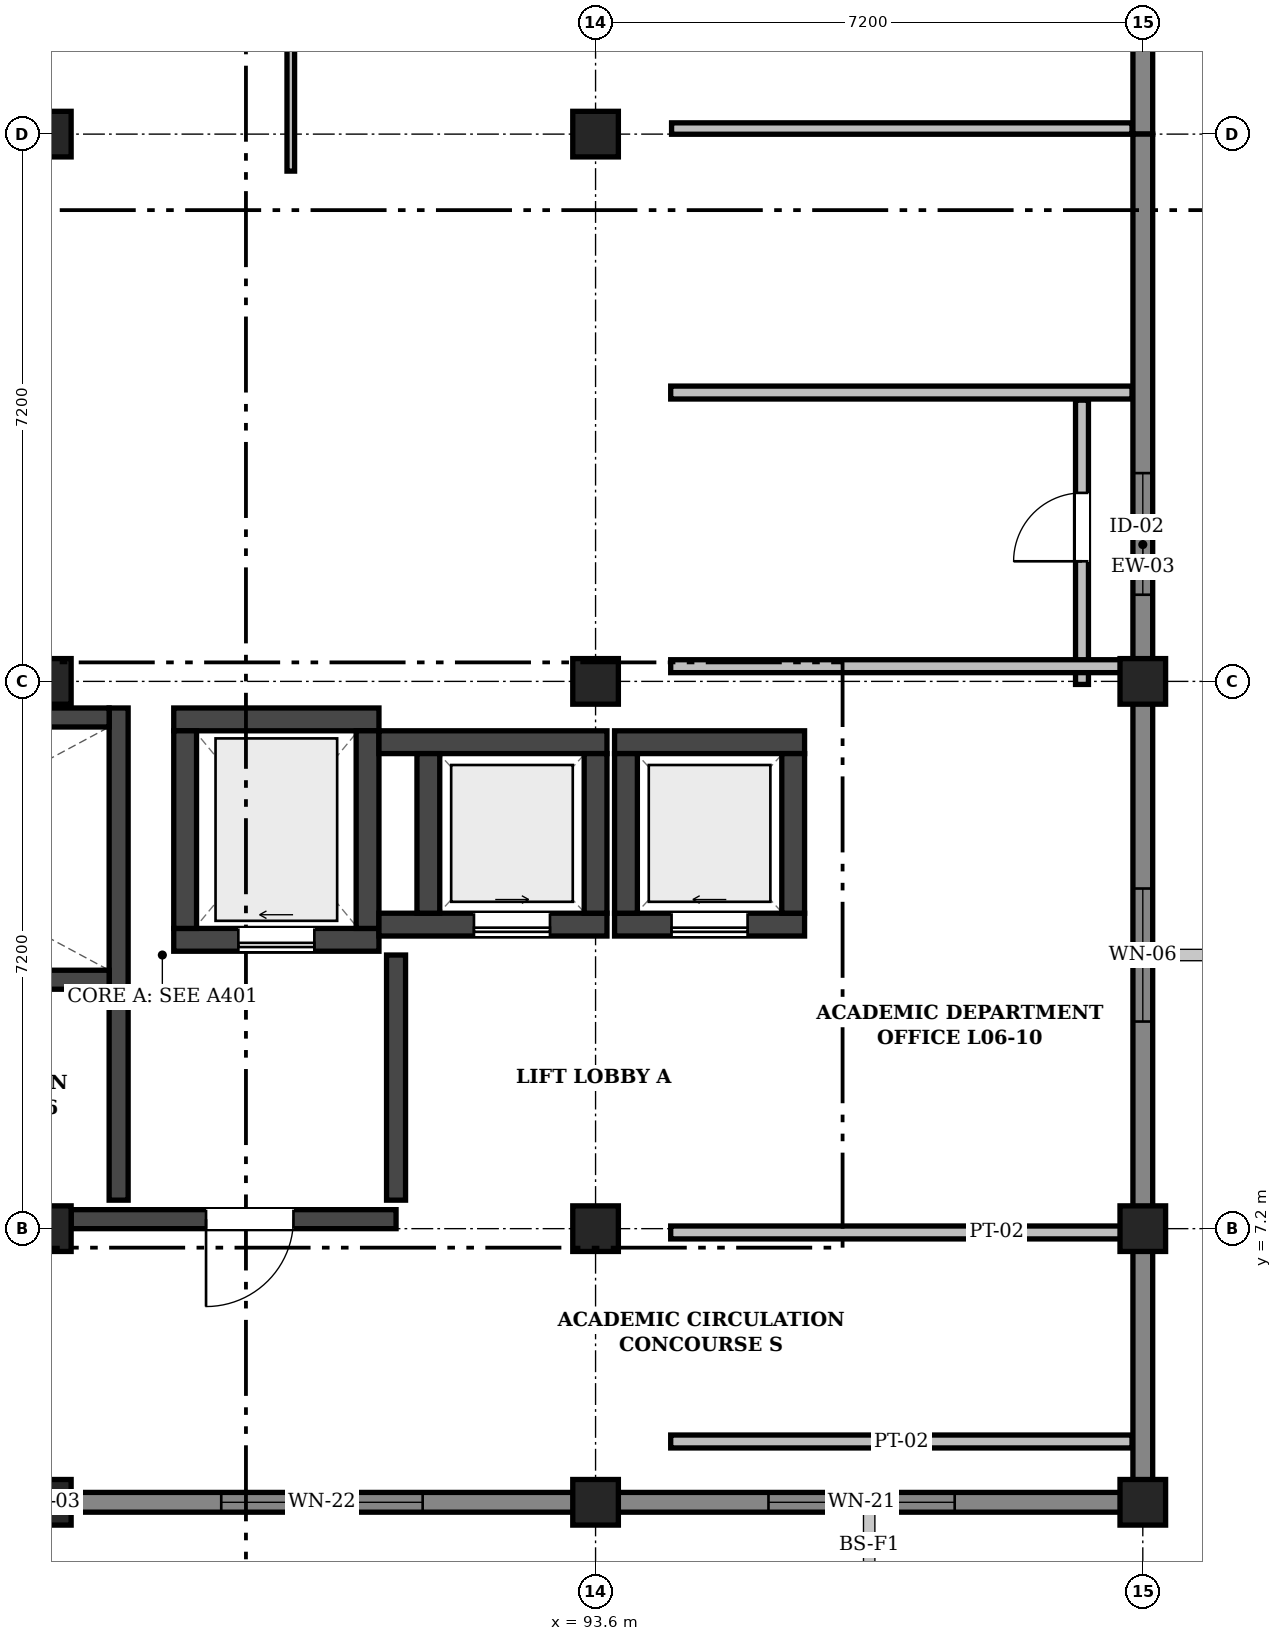
"""IFC4 building model, lengths in metres.
Left out: names, types, materials, properties, quantities, classifications, styles, units other than length and angle.
Written with IfcOpenShell. Run it as: python <this file> out.ifc"""

import sys

from ifc_helpers import new_model, si_unit, direction, frame, frame_2d, origin, origin_2d, place, context, subcontext, project, spatial, rectangle, extrude, element, fill, save


model = new_model("IFC4")
c1 = context("Model", 3, precision=1e-05, world=origin(), true_north=direction((0.0, 1.0)))
c2 = subcontext(c1, "Body", "Model", "MODEL_VIEW")
j1 = project(units=[si_unit("LENGTHUNIT", "METRE"), si_unit("PLANEANGLEUNIT", "RADIAN")], contexts=[c1])
p1 = place(None, origin())
s1 = spatial("IfcSite", under=j1, at=p1, CompositionType="ELEMENT")
p2 = place(p1, origin())
s2 = spatial("IfcBuilding", under=s1, at=p2, CompositionType="ELEMENT")
p3 = place(p2, frame((0.0, 0.0, 27.9)))
s3 = spatial("IfcBuildingStorey", under=s2, at=p3, CompositionType="ELEMENT", Elevation=27.9)
for number, where, z_axis, x_axis in (
    (1, (86.4, 3.6, 0.0), (0.0, 0.0, 1.0), (1.0, 0.0, 0.0)),
    (2, (86.4, 7.2, 0.0), (0.0, 0.0, 1.0), (1.0, 0.0, 0.0)),
    (3, (86.4, 14.4, 0.0), (0.0, 0.0, 1.0), (1.0, 0.0, 0.0)),
    (4, (86.4, 21.6, 0.0), (0.0, 0.0, 1.0), (1.0, 0.0, 0.0)),
    (5, (93.6, 3.6, 0.0), (0.0, 0.0, 1.0), (1.0, 0.0, 0.0)),
    (6, (93.6, 7.2, 0.0), (0.0, 0.0, 1.0), (1.0, 0.0, 0.0)),
    (7, (93.6, 14.4, 0.0), (0.0, 0.0, 1.0), (1.0, 0.0, 0.0)),
    (8, (93.6, 21.6, 0.0), (0.0, 0.0, 1.0), (1.0, 0.0, 0.0)),
    (9, (100.8, 3.6, 0.0), (0.0, 0.0, 1.0), (1.0, 0.0, 0.0)),
    (10, (100.8, 7.2, 0.0), (0.0, 0.0, 1.0), (1.0, 0.0, 0.0)),
    (11, (100.8, 14.4, 0.0), (0.0, 0.0, 1.0), (1.0, 0.0, 0.0)),
):
    element("IfcColumn", number, at=place(p3, frame(where, z_axis=z_axis, x_axis=x_axis)), inside=s3, PredefinedType="COLUMN", context=c2, shape_type="SweptSolid", body=[
        extrude(rectangle(XDim=0.6, YDim=0.6, at=origin_2d()), origin(), (0.0, 0.0, 1.0), 4.5),
    ])
p4 = place(p3, frame((100.95, 3.6, 0.0), z_axis=(0.0, 0.0, 1.0), x_axis=(-1.0, 0.0, 0.0)))
e12 = element("IfcWall", 12, at=p4, inside=s3, PredefinedType="SOLIDWALL", context=c2, shape_type="SweptSolid", body=[
    extrude(rectangle(XDim=7.35, YDim=0.26, at=frame_2d((3.675, 0.0))), origin(), (0.0, 0.0, 1.0), 4.22),
])
p5 = place(p4, frame((2.625, 0.0, 0.95)))
e13 = element("IfcOpeningElement", 13, at=p5, cuts=e12, PredefinedType="OPENING", context=c2, shape_type="SweptSolid", body=[
    extrude(rectangle(XDim=2.45, YDim=1.55, at=frame_2d((1.225, 0.775))), frame((0.0, 0.142, 0.0), z_axis=(0.0, -1.0, 0.0), x_axis=(1.0, 0.0, 0.0)), (0.0, 0.0, 1.0), 0.284),
])
p6 = place(p3, frame((93.6, 3.6, 0.0), z_axis=(0.0, 0.0, 1.0), x_axis=(-1.0, 0.0, 0.0)))
e14 = element("IfcWall", 14, at=p6, inside=s3, PredefinedType="SOLIDWALL", context=c2, shape_type="SweptSolid", body=[
    extrude(rectangle(XDim=7.2, YDim=0.26, at=frame_2d((3.6, 0.0))), origin(), (0.0, 0.0, 1.0), 4.22),
])
p7 = place(p6, frame((2.275, 0.0, 0.95)))
e15 = element("IfcOpeningElement", 15, at=p7, cuts=e14, PredefinedType="OPENING", context=c2, shape_type="SweptSolid", body=[
    extrude(rectangle(XDim=2.65, YDim=1.55, at=frame_2d((1.325, 0.775))), frame((0.0, 0.142, 0.0), z_axis=(0.0, -1.0, 0.0), x_axis=(1.0, 0.0, 0.0)), (0.0, 0.0, 1.0), 0.284),
])
p8 = place(p3, frame((100.8, 28.648, 0.0), z_axis=(0.0, 0.0, 1.0), x_axis=(0.0, -1.0, 0.0)))
e16 = element("IfcWall", 16, at=p8, inside=s3, PredefinedType="SOLIDWALL", context=c2, shape_type="SweptSolid", body=[
    extrude(rectangle(XDim=7.048, YDim=0.26, at=frame_2d((3.524, 0.0))), origin(), (0.0, 0.0, 1.0), 4.22),
])
p9 = place(p8, frame((2.799, 0.0, 0.95)))
e17 = element("IfcOpeningElement", 17, at=p9, cuts=e16, PredefinedType="OPENING", context=c2, shape_type="SweptSolid", body=[
    extrude(rectangle(XDim=1.45, YDim=1.3, at=frame_2d((0.725, 0.65))), frame((0.0, 0.142, 0.0), z_axis=(0.0, -1.0, 0.0), x_axis=(1.0, 0.0, 0.0)), (0.0, 0.0, 1.0), 0.284),
])
p10 = place(p3, frame((100.8, 21.6, 0.0), z_axis=(0.0, 0.0, 1.0), x_axis=(0.0, -1.0, 0.0)))
e18 = element("IfcWall", 18, at=p10, inside=s3, PredefinedType="SOLIDWALL", context=c2, shape_type="SweptSolid", body=[
    extrude(rectangle(XDim=7.2, YDim=0.26, at=frame_2d((3.6, 0.0))), origin(), (0.0, 0.0, 1.0), 4.22),
])
p11 = place(p10, frame((4.46, 0.0, 0.95)))
e19 = element("IfcOpeningElement", 19, at=p11, cuts=e18, PredefinedType="OPENING", context=c2, shape_type="SweptSolid", body=[
    extrude(rectangle(XDim=1.6, YDim=1.3, at=frame_2d((0.8, 0.65))), frame((0.0, 0.142, 0.0), z_axis=(0.0, -1.0, 0.0), x_axis=(1.0, 0.0, 0.0)), (0.0, 0.0, 1.0), 0.284),
])
p12 = place(p3, frame((100.8, 14.4, 0.0), z_axis=(0.0, 0.0, 1.0), x_axis=(0.0, -1.0, 0.0)))
e20 = element("IfcWall", 20, at=p12, inside=s3, PredefinedType="SOLIDWALL", context=c2, shape_type="SweptSolid", body=[
    extrude(rectangle(XDim=7.2, YDim=0.26, at=frame_2d((3.6, 0.0))), origin(), (0.0, 0.0, 1.0), 4.22),
])
p13 = place(p12, frame((2.725, 0.0, 0.95)))
e21 = element("IfcOpeningElement", 21, at=p13, cuts=e20, PredefinedType="OPENING", context=c2, shape_type="SweptSolid", body=[
    extrude(rectangle(XDim=1.75, YDim=1.3, at=frame_2d((0.875, 0.65))), frame((0.0, 0.142, 0.0), z_axis=(0.0, -1.0, 0.0), x_axis=(1.0, 0.0, 0.0)), (0.0, 0.0, 1.0), 0.284),
])
p14 = place(p3, frame((100.8, 7.2, 0.0), z_axis=(0.0, 0.0, 1.0), x_axis=(0.0, -1.0, 0.0)))
e22 = element("IfcWall", 22, at=p14, inside=s3, PredefinedType="SOLIDWALL", context=c2, shape_type="SweptSolid", body=[
    extrude(rectangle(XDim=3.448, YDim=0.26, at=frame_2d((1.724, 0.0))), origin(), (0.0, 0.0, 1.0), 4.22),
])
p15 = place(p3, frame((88.05, 11.0, 0.0), z_axis=(0.0, 0.0, 1.0), x_axis=(1.0, 0.0, 0.0)))
e23 = element("IfcWall", 23, at=p15, inside=s3, PredefinedType="SHEAR", context=c2, shape_type="SweptSolid", body=[
    extrude(rectangle(XDim=2.7, YDim=0.3, at=frame_2d((1.35, 0.0))), origin(), (0.0, 0.0, 1.0), 4.25),
])
p16 = place(p15, frame((0.85, 0.0, 0.0)))
e24 = element("IfcOpeningElement", 24, at=p16, cuts=e23, PredefinedType="OPENING", context=c2, shape_type="SweptSolid", body=[
    extrude(rectangle(XDim=1.0, YDim=2.1, at=frame_2d((0.5, 1.05))), frame((0.0, 0.162, 0.0), z_axis=(0.0, -1.0, 0.0), x_axis=(1.0, 0.0, 0.0)), (0.0, 0.0, 1.0), 0.324),
])
p17 = place(p3, frame((88.05, 13.9, 0.0), z_axis=(0.0, 0.0, 1.0), x_axis=(1.0, 0.0, 0.0)))
e25 = element("IfcWall", 25, at=p17, inside=s3, PredefinedType="SHEAR", context=c2, shape_type="SweptSolid", body=[
    extrude(rectangle(XDim=2.7, YDim=0.3, at=frame_2d((1.35, 0.0))), origin(), (0.0, 0.0, 1.0), 4.25),
])
for number, where, z_axis, x_axis in (
    (26, (88.2, 11.15, 0.0), (0.0, 0.0, 1.0), (0.0, 1.0, 0.0)),
    (27, (90.6, 11.15, 0.0), (0.0, 0.0, 1.0), (0.0, 1.0, 0.0)),
):
    element("IfcWall", number, at=place(p3, frame(where, z_axis=z_axis, x_axis=x_axis)), inside=s3, PredefinedType="SHEAR", context=c2, shape_type="SweptSolid", body=[
        extrude(rectangle(XDim=2.6, YDim=0.3, at=frame_2d((1.3, 0.0))), origin(), (0.0, 0.0, 1.0), 4.25),
    ])
p18 = place(p3, frame((90.75, 11.2, 0.0), z_axis=(0.0, 0.0, 1.0), x_axis=(1.0, 0.0, 0.0)))
e28 = element("IfcWall", 28, at=p18, inside=s3, PredefinedType="SHEAR", context=c2, shape_type="SweptSolid", body=[
    extrude(rectangle(XDim=3.0, YDim=0.3, at=frame_2d((1.5, 0.0))), origin(), (0.0, 0.0, 1.0), 4.25),
])
p19 = place(p18, frame((1.25, 0.0, 0.0)))
e29 = element("IfcOpeningElement", 29, at=p19, cuts=e28, PredefinedType="OPENING", context=c2, shape_type="SweptSolid", body=[
    extrude(rectangle(XDim=1.0, YDim=2.1, at=frame_2d((0.5, 1.05))), frame((0.0, 0.162, 0.0), z_axis=(0.0, -1.0, 0.0), x_axis=(1.0, 0.0, 0.0)), (0.0, 0.0, 1.0), 0.324),
])
p20 = place(p3, frame((90.75, 13.6, 0.0), z_axis=(0.0, 0.0, 1.0), x_axis=(1.0, 0.0, 0.0)))
e30 = element("IfcWall", 30, at=p20, inside=s3, PredefinedType="SHEAR", context=c2, shape_type="SweptSolid", body=[
    extrude(rectangle(XDim=3.0, YDim=0.3, at=frame_2d((1.5, 0.0))), origin(), (0.0, 0.0, 1.0), 4.25),
])
for number, where, z_axis, x_axis in (
    (31, (91.4, 11.35, 0.0), (0.0, 0.0, 1.0), (0.0, 1.0, 0.0)),
    (32, (93.6, 11.35, 0.0), (0.0, 0.0, 1.0), (0.0, 1.0, 0.0)),
):
    element("IfcWall", number, at=place(p3, frame(where, z_axis=z_axis, x_axis=x_axis)), inside=s3, PredefinedType="SHEAR", context=c2, shape_type="SweptSolid", body=[
        extrude(rectangle(XDim=2.1, YDim=0.3, at=frame_2d((1.05, 0.0))), origin(), (0.0, 0.0, 1.0), 4.25),
    ])
p21 = place(p3, frame((93.85, 11.2, 0.0), z_axis=(0.0, 0.0, 1.0), x_axis=(1.0, 0.0, 0.0)))
e33 = element("IfcWall", 33, at=p21, inside=s3, PredefinedType="SHEAR", context=c2, shape_type="SweptSolid", body=[
    extrude(rectangle(XDim=2.5, YDim=0.3, at=frame_2d((1.25, 0.0))), origin(), (0.0, 0.0, 1.0), 4.25),
])
p22 = place(p21, frame((0.75, 0.0, 0.0)))
e34 = element("IfcOpeningElement", 34, at=p22, cuts=e33, PredefinedType="OPENING", context=c2, shape_type="SweptSolid", body=[
    extrude(rectangle(XDim=1.0, YDim=2.1, at=frame_2d((0.5, 1.05))), frame((0.0, 0.162, 0.0), z_axis=(0.0, -1.0, 0.0), x_axis=(1.0, 0.0, 0.0)), (0.0, 0.0, 1.0), 0.324),
])
p23 = place(p3, frame((93.85, 13.6, 0.0), z_axis=(0.0, 0.0, 1.0), x_axis=(1.0, 0.0, 0.0)))
e35 = element("IfcWall", 35, at=p23, inside=s3, PredefinedType="SHEAR", context=c2, shape_type="SweptSolid", body=[
    extrude(rectangle(XDim=2.5, YDim=0.3, at=frame_2d((1.25, 0.0))), origin(), (0.0, 0.0, 1.0), 4.25),
])
for number, where, z_axis, x_axis in (
    (36, (94.0, 11.35, 0.0), (0.0, 0.0, 1.0), (0.0, 1.0, 0.0)),
    (37, (96.2, 11.35, 0.0), (0.0, 0.0, 1.0), (0.0, 1.0, 0.0)),
):
    element("IfcWall", number, at=place(p3, frame(where, z_axis=z_axis, x_axis=x_axis)), inside=s3, PredefinedType="SHEAR", context=c2, shape_type="SweptSolid", body=[
        extrude(rectangle(XDim=2.1, YDim=0.3, at=frame_2d((1.05, 0.0))), origin(), (0.0, 0.0, 1.0), 4.25),
    ])
p24 = place(p3, frame((87.325, 10.35, 0.0), z_axis=(0.0, 0.0, 1.0), x_axis=(0.0, 1.0, 0.0)))
e38 = element("IfcWall", 38, at=p24, inside=s3, PredefinedType="SHEAR", context=c2, shape_type="SweptSolid", body=[
    extrude(rectangle(XDim=3.7, YDim=0.25, at=frame_2d((1.85, 0.0))), origin(), (0.0, 0.0, 1.0), 4.25),
])
for number, where, z_axis, x_axis in (
    (39, (79.6, 10.475, 0.0), (0.0, 0.0, 1.0), (1.0, 0.0, 0.0)),
    (40, (79.6, 13.925, 0.0), (0.0, 0.0, 1.0), (1.0, 0.0, 0.0)),
):
    element("IfcWall", number, at=place(p3, frame(where, z_axis=z_axis, x_axis=x_axis)), inside=s3, PredefinedType="SHEAR", context=c2, shape_type="SweptSolid", body=[
        extrude(rectangle(XDim=7.6, YDim=0.25, at=frame_2d((3.8, 0.0))), origin(), (0.0, 0.0, 1.0), 4.25),
    ])
p25 = place(p3, frame((86.7, 7.325, 0.0), z_axis=(0.0, 0.0, 1.0), x_axis=(1.0, 0.0, 0.0)))
e41 = element("IfcWall", 41, at=p25, inside=s3, PredefinedType="SHEAR", context=c2, shape_type="SweptSolid", body=[
    extrude(rectangle(XDim=4.275, YDim=0.25, at=frame_2d((2.138, 0.0))), origin(), (0.0, 0.0, 1.0), 4.25),
])
p26 = place(p25, frame((1.775, 0.0, 0.0)))
e42 = element("IfcOpeningElement", 42, at=p26, cuts=e41, PredefinedType="OPENING", context=c2, shape_type="SweptSolid", body=[
    extrude(rectangle(XDim=1.15, YDim=2.15, at=frame_2d((0.575, 1.075))), frame((0.0, 0.137, 0.0), z_axis=(0.0, -1.0, 0.0), x_axis=(1.0, 0.0, 0.0)), (0.0, 0.0, 1.0), 0.274),
])
p27 = place(p3, frame((87.325, 7.575, 0.0), z_axis=(0.0, 0.0, 1.0), x_axis=(0.0, 1.0, 0.0)))
e43 = element("IfcWall", 43, at=p27, inside=s3, PredefinedType="SHEAR", context=c2, shape_type="SweptSolid", body=[
    extrude(rectangle(XDim=2.77, YDim=0.25, at=frame_2d((1.385, 0.0))), origin(), (0.0, 0.0, 1.0), 4.25),
])
p28 = place(p3, frame((90.975, 7.575, 0.0), z_axis=(0.0, 0.0, 1.0), x_axis=(0.0, 1.0, 0.0)))
e44 = element("IfcWall", 44, at=p28, inside=s3, PredefinedType="SHEAR", context=c2, shape_type="SweptSolid", body=[
    extrude(rectangle(XDim=3.225, YDim=0.25, at=frame_2d((1.613, 0.0))), origin(), (0.0, 0.0, 1.0), 4.25),
])
p29 = place(p3, frame((94.588, 18.2, 0.0), z_axis=(0.0, 0.0, 1.0), x_axis=(1.0, 0.0, 0.0)))
e45 = element("IfcWall", 45, at=p29, inside=s3, PredefinedType="PARTITIONING", context=c2, shape_type="SweptSolid", body=[
    extrude(rectangle(XDim=6.07, YDim=0.17, at=frame_2d((3.035, 0.0))), origin(), (0.0, 0.0, 1.0), 4.16),
])
p30 = place(p3, frame((100.0, 14.36, 0.0), z_axis=(0.0, 0.0, 1.0), x_axis=(0.0, 1.0, 0.0)))
e46 = element("IfcWall", 46, at=p30, inside=s3, PredefinedType="PARTITIONING", context=c2, shape_type="SweptSolid", body=[
    extrude(rectangle(XDim=3.74, YDim=0.17, at=frame_2d((1.87, 0.0))), origin(), (0.0, 0.0, 1.0), 4.16),
])
p31 = place(p30, frame((1.62, 0.0, 0.0)))
e47 = element("IfcOpeningElement", 47, at=p31, cuts=e46, PredefinedType="OPENING", context=c2, shape_type="SweptSolid", body=[
    extrude(rectangle(XDim=0.9, YDim=2.08, at=frame_2d((0.45, 1.04))), frame((0.0, 0.097, 0.0), z_axis=(0.0, -1.0, 0.0), x_axis=(1.0, 0.0, 0.0)), (0.0, 0.0, 1.0), 0.194),
])
p32 = place(p3, frame((94.588, 14.6, 0.0), z_axis=(0.0, 0.0, 1.0), x_axis=(1.0, 0.0, 0.0)))
e48 = element("IfcWall", 48, at=p32, inside=s3, PredefinedType="PARTITIONING", context=c2, shape_type="SweptSolid", body=[
    extrude(rectangle(XDim=6.07, YDim=0.17, at=frame_2d((3.035, 0.0))), origin(), (0.0, 0.0, 1.0), 3.8),
])
p33 = place(p3, frame((94.588, 4.4, 0.0), z_axis=(0.0, 0.0, 1.0), x_axis=(1.0, 0.0, 0.0)))
e49 = element("IfcWall", 49, at=p33, inside=s3, PredefinedType="PARTITIONING", context=c2, shape_type="SweptSolid", body=[
    extrude(rectangle(XDim=6.07, YDim=0.17, at=frame_2d((3.035, 0.0))), origin(), (0.0, 0.0, 1.0), 4.16),
])
p34 = place(p3, frame((94.588, 7.15, 0.0), z_axis=(0.0, 0.0, 1.0), x_axis=(1.0, 0.0, 0.0)))
e50 = element("IfcWall", 50, at=p34, inside=s3, PredefinedType="PARTITIONING", context=c2, shape_type="SweptSolid", body=[
    extrude(rectangle(XDim=6.07, YDim=0.17, at=frame_2d((3.035, 0.0))), origin(), (0.0, 0.0, 1.0), 3.8),
])
p35 = place(p3, frame((89.59, 21.113, 0.0), z_axis=(0.0, 0.0, 1.0), x_axis=(0.0, 1.0, 0.0)))
e51 = element("IfcWall", 51, at=p35, inside=s3, PredefinedType="PARTITIONING", context=c2, shape_type="SweptSolid", body=[
    extrude(rectangle(XDim=11.517, YDim=0.1, at=frame_2d((5.758, 0.0))), origin(), (0.0, 0.0, 1.0), 4.16),
])
p36 = place(p3, frame((94.6, 21.673, 0.0), z_axis=(0.0, 0.0, 1.0), x_axis=(1.0, 0.0, 0.0)))
e52 = element("IfcWall", 52, at=p36, inside=s3, PredefinedType="PARTITIONING", context=c2, shape_type="SweptSolid", body=[
    extrude(rectangle(XDim=6.058, YDim=0.15, at=frame_2d((3.029, 0.0))), origin(), (0.0, 0.0, 1.0), 4.16),
])
p37 = place(p5, origin())
e53 = element("IfcWindow", 53, at=p37, inside=s3, PartitioningType="SINGLE_PANEL", PredefinedType="WINDOW", context=c2, shape_type="SweptSolid", body=[
    extrude(rectangle(XDim=2.45, YDim=1.55, at=frame_2d((1.225, 0.775))), frame((0.0, 0.03, 0.0), z_axis=(0.0, -1.0, 0.0), x_axis=(1.0, 0.0, 0.0)), (0.0, 0.0, 1.0), 0.06),
])
fill(e13, e53)
p38 = place(p7, origin())
e54 = element("IfcWindow", 54, at=p38, inside=s3, PartitioningType="SINGLE_PANEL", PredefinedType="WINDOW", context=c2, shape_type="SweptSolid", body=[
    extrude(rectangle(XDim=2.65, YDim=1.55, at=frame_2d((1.325, 0.775))), frame((0.0, 0.03, 0.0), z_axis=(0.0, -1.0, 0.0), x_axis=(1.0, 0.0, 0.0)), (0.0, 0.0, 1.0), 0.06),
])
fill(e15, e54)
p39 = place(p11, origin())
e55 = element("IfcWindow", 55, at=p39, inside=s3, PartitioningType="SINGLE_PANEL", PredefinedType="WINDOW", context=c2, shape_type="SweptSolid", body=[
    extrude(rectangle(XDim=1.6, YDim=1.3, at=frame_2d((0.8, 0.65))), frame((0.0, 0.03, 0.0), z_axis=(0.0, -1.0, 0.0), x_axis=(1.0, 0.0, 0.0)), (0.0, 0.0, 1.0), 0.06),
])
fill(e19, e55)
p40 = place(p13, origin())
e56 = element("IfcWindow", 56, at=p40, inside=s3, PartitioningType="SINGLE_PANEL", PredefinedType="WINDOW", context=c2, shape_type="SweptSolid", body=[
    extrude(rectangle(XDim=1.75, YDim=1.3, at=frame_2d((0.875, 0.65))), frame((0.0, 0.03, 0.0), z_axis=(0.0, -1.0, 0.0), x_axis=(1.0, 0.0, 0.0)), (0.0, 0.0, 1.0), 0.06),
])
fill(e21, e56)
p41 = place(p16, frame((1.0, 0.0, 0.0), z_axis=(0.0, 0.0, 1.0), x_axis=(-1.0, 0.0, 0.0)))
e57 = element("IfcDoor", 57, at=p41, inside=s3, OperationType="SLIDING_TO_LEFT", PredefinedType="DOOR", context=c2, shape_type="SweptSolid", body=[
    extrude(rectangle(XDim=1.0, YDim=2.1, at=frame_2d((0.5, 1.05))), frame((0.0, 0.025, 0.0), z_axis=(0.0, -1.0, 0.0), x_axis=(1.0, 0.0, 0.0)), (0.0, 0.0, 1.0), 0.05),
])
fill(e24, e57)
p42 = place(p19, frame((1.0, 0.0, 0.0), z_axis=(0.0, 0.0, 1.0), x_axis=(-1.0, 0.0, 0.0)))
e58 = element("IfcDoor", 58, at=p42, inside=s3, OperationType="SLIDING_TO_RIGHT", PredefinedType="DOOR", context=c2, shape_type="SweptSolid", body=[
    extrude(rectangle(XDim=1.0, YDim=2.1, at=frame_2d((0.5, 1.05))), frame((0.0, 0.025, 0.0), z_axis=(0.0, -1.0, 0.0), x_axis=(1.0, 0.0, 0.0)), (0.0, 0.0, 1.0), 0.05),
])
fill(e29, e58)
p43 = place(p22, frame((1.0, 0.0, 0.0), z_axis=(0.0, 0.0, 1.0), x_axis=(-1.0, 0.0, 0.0)))
e59 = element("IfcDoor", 59, at=p43, inside=s3, OperationType="SLIDING_TO_LEFT", PredefinedType="DOOR", context=c2, shape_type="SweptSolid", body=[
    extrude(rectangle(XDim=1.0, YDim=2.1, at=frame_2d((0.5, 1.05))), frame((0.0, 0.025, 0.0), z_axis=(0.0, -1.0, 0.0), x_axis=(1.0, 0.0, 0.0)), (0.0, 0.0, 1.0), 0.05),
])
fill(e34, e59)
p44 = place(p26, frame((1.15, 0.0, 0.0), z_axis=(0.0, 0.0, 1.0), x_axis=(-1.0, 0.0, 0.0)))
e60 = element("IfcDoor", 60, at=p44, inside=s3, OperationType="SINGLE_SWING_RIGHT", PredefinedType="DOOR", context=c2, shape_type="SweptSolid", body=[
    extrude(rectangle(XDim=1.15, YDim=2.15, at=frame_2d((0.575, 1.075))), frame((0.0, 0.025, 0.0), z_axis=(0.0, -1.0, 0.0), x_axis=(1.0, 0.0, 0.0)), (0.0, 0.0, 1.0), 0.05),
])
fill(e42, e60)
p45 = place(p31, origin())
e61 = element("IfcDoor", 61, at=p45, inside=s3, OperationType="SINGLE_SWING_LEFT", PredefinedType="DOOR", context=c2, shape_type="SweptSolid", body=[
    extrude(rectangle(XDim=0.9, YDim=2.08, at=frame_2d((0.45, 1.04))), frame((0.0, 0.025, 0.0), z_axis=(0.0, -1.0, 0.0), x_axis=(1.0, 0.0, 0.0)), (0.0, 0.0, 1.0), 0.05),
])
fill(e47, e61)
save(model, sys.argv[1])
